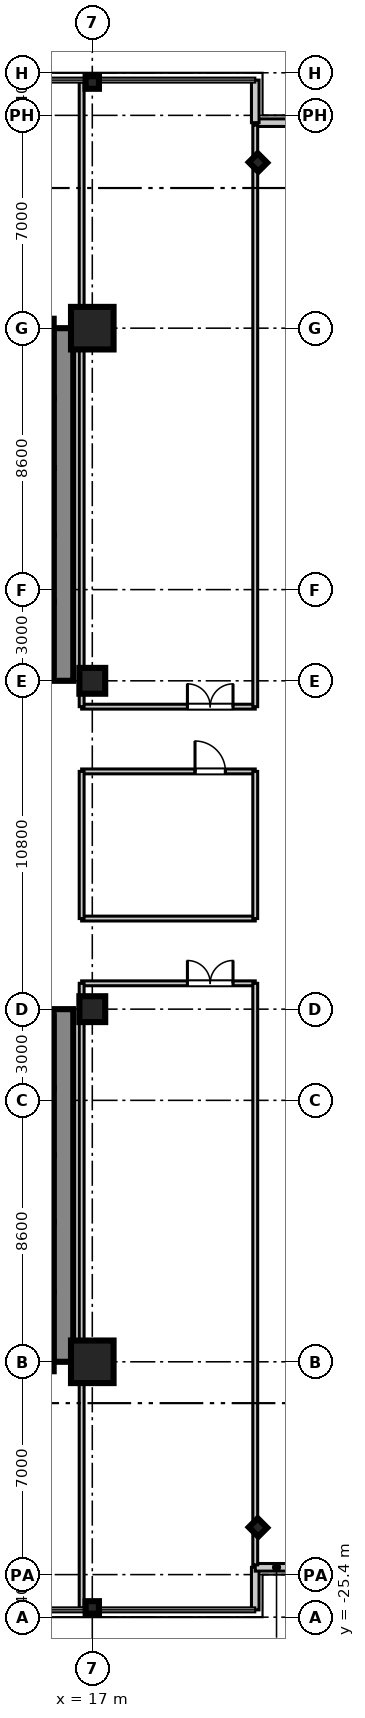
"""IFC4 building model, lengths in metres.
Left out: names, types, materials, properties, quantities, classifications, styles, units other than length and angle.
Written with IfcOpenShell. Run it as: python <this file> out.ifc"""

import sys

from ifc_helpers import new_model, si_unit, direction, frame, frame_2d, origin, origin_2d, place, context, subcontext, project, spatial, rectangle, i_section, extrude, source, transform, mapped, element, fill, save


model = new_model("IFC4")
c1 = context("Model", 3, precision=1e-05, world=origin(), true_north=direction((0.0, 1.0)))
c2 = subcontext(c1, "Body", "Model", "MODEL_VIEW")
j1 = project(units=[si_unit("LENGTHUNIT", "METRE"), si_unit("PLANEANGLEUNIT", "RADIAN")], contexts=[c1])
p1 = place(None, origin())
s1 = spatial("IfcSite", under=j1, at=p1, CompositionType="ELEMENT")
p2 = place(p1, origin())
s2 = spatial("IfcBuilding", under=s1, at=p2, CompositionType="ELEMENT")
p3 = place(p2, frame((0.0, 0.0, 39.7)))
s3 = spatial("IfcBuildingStorey", under=s2, at=p3, CompositionType="ELEMENT", Elevation=39.7)
m1 = source(origin(), c2, "Body", "SweptSolid", [
    extrude(rectangle(XDim=1.4, YDim=1.4, at=origin_2d()), origin(), (0.0, 0.0, 1.0), 3.605),
])
p4 = place(p3, frame((17.0, -17.0, 0.0), z_axis=(0.0, 0.0, 1.0), x_axis=(1.0, 0.0, 0.0)))
e1 = element("IfcColumn", 1, at=p4, inside=s3, PredefinedType="COLUMN", context=c2, shape_type="MappedRepresentation", body=[
    mapped(m1, transform((0.0, 0.0, 0.0), scale=1.0)),
])
m2 = source(origin(), c2, "Body", "SweptSolid", [
    extrude(rectangle(XDim=0.85, YDim=0.85, at=origin_2d()), origin(), (0.0, 0.0, 1.0), 3.605),
])
for number, where, z_axis, x_axis in (
    (2, (17.0, -5.4, 0.0), (0.0, 0.0, 1.0), (1.0, 0.0, 0.0)),
    (3, (17.0, 5.4, 0.0), (0.0, 0.0, 1.0), (1.0, 0.0, 0.0)),
):
    element("IfcColumn", number, at=place(p3, frame(where, z_axis=z_axis, x_axis=x_axis)), inside=s3, PredefinedType="PILASTER", context=c2, shape_type="MappedRepresentation", body=[
        mapped(m2, transform((0.0, 0.0, 0.0), scale=1.0)),
    ])
p5 = place(p3, frame((17.0, 17.0, 0.0), z_axis=(0.0, 0.0, 1.0), x_axis=(1.0, 0.0, 0.0)))
e4 = element("IfcColumn", 4, at=p5, inside=s3, PredefinedType="COLUMN", context=c2, shape_type="MappedRepresentation", body=[
    mapped(m1, transform((0.0, 0.0, 0.0), scale=1.0)),
])
m3 = source(origin(), c2, "Body", "SweptSolid", [
    extrude(i_section(OverallWidth=0.412, OverallDepth=0.438, WebThickness=0.023, FlangeThickness=0.036, at=origin_2d()), origin(), (0.0, 0.0, 1.0), 3.605),
])
for number, where, z_axis, x_axis in (
    (5, (17.0, -25.08, 0.0), (0.0, 0.0, 1.0), (0.0, 1.0, 0.0)),
    (6, (17.0, 25.08, 0.0), (0.0, 0.0, 1.0), (0.0, 1.0, 0.0)),
    (7, (22.45, -22.45, 0.0), (0.0, 0.0, 1.0), (0.707, 0.707, 0.0)),
    (8, (22.45, 22.45, 0.0), (0.0, 0.0, 1.0), (0.707, 0.707, 0.0)),
):
    element("IfcColumn", number, at=place(p3, frame(where, z_axis=z_axis, x_axis=x_axis)), inside=s3, PredefinedType="COLUMN", context=c2, shape_type="MappedRepresentation", body=[
        mapped(m3, transform((0.0, 0.0, 0.0), scale=1.0)),
    ])
m4 = source(origin(), c2, "Body", "SweptSolid", [
    extrude(rectangle(XDim=11.6, YDim=0.65, at=frame_2d((5.8, 0.0))), origin(), (0.0, 0.0, 1.0), 3.37),
])
for number, where, z_axis, x_axis in (
    (9, (16.05, 5.4, 0.0), (0.0, 0.0, 1.0), (0.0, 1.0, 0.0)),
    (10, (16.05, -17.0, 0.0), (0.0, 0.0, 1.0), (0.0, 1.0, 0.0)),
):
    element("IfcWall", number, at=place(p3, frame(where, z_axis=z_axis, x_axis=x_axis)), inside=s3, PredefinedType="SHEAR", context=c2, shape_type="MappedRepresentation", body=[
        mapped(m4, transform((0.0, 0.0, 0.0), scale=1.0)),
    ])
m5 = source(origin(), c2, "Body", "SweptSolid", [
    extrude(rectangle(XDim=2.36, YDim=0.22, at=frame_2d((1.18, 0.0))), origin(), (0.0, 0.0, 1.0), 3.37),
])
p6 = place(p3, frame((15.62, 5.64, 0.0), z_axis=(0.0, 0.0, 1.0), x_axis=(0.0, 1.0, 0.0)))
e11 = element("IfcWall", 11, at=p6, inside=s3, PredefinedType="SHEAR", context=c2, shape_type="MappedRepresentation", body=[
    mapped(m5, transform((0.0, 0.0, 0.0), scale=1.0)),
])
m6 = source(origin(), c2, "Body", "SweptSolid", [
    extrude(rectangle(XDim=2.2, YDim=0.22, at=frame_2d((1.1, 0.0))), origin(), (0.0, 0.0, 1.0), 3.37),
])
for number, where, z_axis, x_axis in (
    (12, (15.62, 8.0, 0.0), (0.0, 0.0, 1.0), (0.0, 1.0, 0.0)),
    (13, (15.62, 10.2, 0.0), (0.0, 0.0, 1.0), (0.0, 1.0, 0.0)),
):
    element("IfcWall", number, at=place(p3, frame(where, z_axis=z_axis, x_axis=x_axis)), inside=s3, PredefinedType="SHEAR", context=c2, shape_type="MappedRepresentation", body=[
        mapped(m6, transform((0.0, 0.0, 0.0), scale=1.0)),
    ])
m7 = source(origin(), c2, "Body", "SweptSolid", [
    extrude(rectangle(XDim=2.3, YDim=0.22, at=frame_2d((1.15, 0.0))), origin(), (0.0, 0.0, 1.0), 3.37),
])
p7 = place(p3, frame((15.62, 12.4, 0.0), z_axis=(0.0, 0.0, 1.0), x_axis=(0.0, 1.0, 0.0)))
e14 = element("IfcWall", 14, at=p7, inside=s3, PredefinedType="SHEAR", context=c2, shape_type="MappedRepresentation", body=[
    mapped(m7, transform((0.0, 0.0, 0.0), scale=1.0)),
])
p8 = place(p3, frame((15.62, -8.0, 0.0), z_axis=(0.0, 0.0, 1.0), x_axis=(0.0, 1.0, 0.0)))
e15 = element("IfcWall", 15, at=p8, inside=s3, PredefinedType="SHEAR", context=c2, shape_type="MappedRepresentation", body=[
    mapped(m5, transform((0.0, 0.0, 0.0), scale=1.0)),
])
for number, where, z_axis, x_axis in (
    (16, (15.62, -10.2, 0.0), (0.0, 0.0, 1.0), (0.0, 1.0, 0.0)),
    (17, (15.62, -12.4, 0.0), (0.0, 0.0, 1.0), (0.0, 1.0, 0.0)),
):
    element("IfcWall", number, at=place(p3, frame(where, z_axis=z_axis, x_axis=x_axis)), inside=s3, PredefinedType="SHEAR", context=c2, shape_type="MappedRepresentation", body=[
        mapped(m6, transform((0.0, 0.0, 0.0), scale=1.0)),
    ])
p9 = place(p3, frame((15.62, -14.7, 0.0), z_axis=(0.0, 0.0, 1.0), x_axis=(0.0, 1.0, 0.0)))
e18 = element("IfcWall", 18, at=p9, inside=s3, PredefinedType="SHEAR", context=c2, shape_type="MappedRepresentation", body=[
    mapped(m7, transform((0.0, 0.0, 0.0), scale=1.0)),
])
m8 = source(origin(), c2, "Body", "SweptSolid", [
    extrude(rectangle(XDim=2.61, YDim=0.22, at=frame_2d((1.305, 0.0))), origin(), (0.0, 0.0, 1.0), 3.37),
])
for number, where, z_axis, x_axis in (
    (19, (15.62, 14.7, 0.0), (0.0, 0.0, 1.0), (0.0, 1.0, 0.0)),
    (20, (15.62, -17.31, 0.0), (0.0, 0.0, 1.0), (0.0, 1.0, 0.0)),
):
    element("IfcWall", number, at=place(p3, frame(where, z_axis=z_axis, x_axis=x_axis)), inside=s3, PredefinedType="SHEAR", context=c2, shape_type="MappedRepresentation", body=[
        mapped(m8, transform((0.0, 0.0, 0.0), scale=1.0)),
    ])
m9 = source(origin(), c2, "Body", "SweptSolid", [
    extrude(rectangle(XDim=1.4, YDim=0.25, at=frame_2d((0.7, 0.0))), origin(), (0.0, 0.0, 1.0), 3.37),
])
for number, where, z_axis, x_axis in (
    (21, (22.36, -25.16, 0.0), (0.0, 0.0, 1.0), (0.0, 1.0, 0.0)),
    (22, (22.36, -23.76, 0.0), (0.0, 0.0, 1.0), (1.0, 0.0, 0.0)),
    (23, (22.36, 23.76, 0.0), (0.0, 0.0, 1.0), (1.0, 0.0, 0.0)),
    (24, (22.36, 23.76, 0.0), (0.0, 0.0, 1.0), (0.0, 1.0, 0.0)),
):
    element("IfcWall", number, at=place(p3, frame(where, z_axis=z_axis, x_axis=x_axis)), inside=s3, PredefinedType="STANDARD", context=c2, shape_type="MappedRepresentation", body=[
        mapped(m9, transform((0.0, 0.0, 0.0), scale=1.0)),
    ])
m10 = source(origin(), c2, "Body", "SweptSolid", [
    extrude(rectangle(XDim=5.71, YDim=0.16, at=frame_2d((2.855, 0.0))), origin(), (0.0, 0.0, 1.0), 2.71),
])
p10 = place(p3, frame((16.65, 4.55, 0.0), z_axis=(0.0, 0.0, 1.0), x_axis=(1.0, 0.0, 0.0)))
e25 = element("IfcWall", 25, at=p10, inside=s3, PredefinedType="PARTITIONING", context=c2, shape_type="MappedRepresentation", body=[
    mapped(m10, transform((0.0, 0.0, 0.0), scale=1.0)),
])
p11 = place(p10, frame((3.479, 0.0, 0.0)))
e26 = element("IfcOpeningElement", 26, at=p11, cuts=e25, PredefinedType="OPENING", context=c2, shape_type="SweptSolid", body=[
    extrude(rectangle(XDim=1.5, YDim=2.15, at=frame_2d((0.75, 1.075))), frame((0.0, 0.09, 0.0), z_axis=(0.0, -1.0, 0.0), x_axis=(1.0, 0.0, 0.0)), (0.0, 0.0, 1.0), 0.18),
])
m11 = source(origin(), c2, "Body", "SweptSolid", [
    extrude(rectangle(XDim=20.55, YDim=0.16, at=frame_2d((10.275, 0.0))), origin(), (0.0, 0.0, 1.0), 2.71),
])
p12 = place(p3, frame((16.65, 4.55, 0.0), z_axis=(0.0, 0.0, 1.0), x_axis=(0.0, 1.0, 0.0)))
e27 = element("IfcWall", 27, at=p12, inside=s3, PredefinedType="PARTITIONING", context=c2, shape_type="MappedRepresentation", body=[
    mapped(m11, transform((0.0, 0.0, 0.0), scale=1.0)),
])
m12 = source(origin(), c2, "Body", "SweptSolid", [
    extrude(rectangle(XDim=19.13, YDim=0.16, at=frame_2d((9.565, 0.0))), origin(), (0.0, 0.0, 1.0), 2.71),
])
p13 = place(p3, frame((22.36, 4.55, 0.0), z_axis=(0.0, 0.0, 1.0), x_axis=(0.0, 1.0, 0.0)))
e28 = element("IfcWall", 28, at=p13, inside=s3, PredefinedType="PARTITIONING", context=c2, shape_type="MappedRepresentation", body=[
    mapped(m12, transform((0.0, 0.0, 0.0), scale=1.0)),
])
p14 = place(p3, frame((16.65, -4.55, 0.0), z_axis=(0.0, 0.0, 1.0), x_axis=(1.0, 0.0, 0.0)))
e29 = element("IfcWall", 29, at=p14, inside=s3, PredefinedType="PARTITIONING", context=c2, shape_type="MappedRepresentation", body=[
    mapped(m10, transform((0.0, 0.0, 0.0), scale=1.0)),
])
p15 = place(p14, frame((3.479, 0.0, 0.0)))
e30 = element("IfcOpeningElement", 30, at=p15, cuts=e29, PredefinedType="OPENING", context=c2, shape_type="SweptSolid", body=[
    extrude(rectangle(XDim=1.5, YDim=2.15, at=frame_2d((0.75, 1.075))), frame((0.0, 0.09, 0.0), z_axis=(0.0, -1.0, 0.0), x_axis=(1.0, 0.0, 0.0)), (0.0, 0.0, 1.0), 0.18),
])
p16 = place(p3, frame((16.65, -25.1, 0.0), z_axis=(0.0, 0.0, 1.0), x_axis=(0.0, 1.0, 0.0)))
e31 = element("IfcWall", 31, at=p16, inside=s3, PredefinedType="PARTITIONING", context=c2, shape_type="MappedRepresentation", body=[
    mapped(m11, transform((0.0, 0.0, 0.0), scale=1.0)),
])
p17 = place(p3, frame((22.36, -23.68, 0.0), z_axis=(0.0, 0.0, 1.0), x_axis=(0.0, 1.0, 0.0)))
e32 = element("IfcWall", 32, at=p17, inside=s3, PredefinedType="PARTITIONING", context=c2, shape_type="MappedRepresentation", body=[
    mapped(m12, transform((0.0, 0.0, 0.0), scale=1.0)),
])
p18 = place(p3, frame((16.65, -2.42, 0.0), z_axis=(0.0, 0.0, 1.0), x_axis=(1.0, 0.0, 0.0)))
e33 = element("IfcWall", 33, at=p18, inside=s3, PredefinedType="PARTITIONING", context=c2, shape_type="MappedRepresentation", body=[
    mapped(m10, transform((0.0, 0.0, 0.0), scale=1.0)),
])
p19 = place(p3, frame((16.65, 2.42, 0.0), z_axis=(0.0, 0.0, 1.0), x_axis=(1.0, 0.0, 0.0)))
e34 = element("IfcWall", 34, at=p19, inside=s3, PredefinedType="PARTITIONING", context=c2, shape_type="MappedRepresentation", body=[
    mapped(m10, transform((0.0, 0.0, 0.0), scale=1.0)),
])
p20 = place(p19, frame((3.729, 0.0, 0.0)))
e35 = element("IfcOpeningElement", 35, at=p20, cuts=e34, PredefinedType="OPENING", context=c2, shape_type="SweptSolid", body=[
    extrude(rectangle(XDim=1.0, YDim=2.1, at=frame_2d((0.5, 1.05))), frame((0.0, 0.09, 0.0), z_axis=(0.0, -1.0, 0.0), x_axis=(1.0, 0.0, 0.0)), (0.0, 0.0, 1.0), 0.18),
])
m13 = source(origin(), c2, "Body", "SweptSolid", [
    extrude(rectangle(XDim=4.84, YDim=0.16, at=frame_2d((2.42, 0.0))), origin(), (0.0, 0.0, 1.0), 2.71),
])
for number, where, z_axis, x_axis in (
    (36, (16.65, -2.42, 0.0), (0.0, 0.0, 1.0), (0.0, 1.0, 0.0)),
    (37, (22.36, -2.42, 0.0), (0.0, 0.0, 1.0), (0.0, 1.0, 0.0)),
):
    element("IfcWall", number, at=place(p3, frame(where, z_axis=z_axis, x_axis=x_axis)), inside=s3, PredefinedType="PARTITIONING", context=c2, shape_type="MappedRepresentation", body=[
        mapped(m13, transform((0.0, 0.0, 0.0), scale=1.0)),
    ])
m14 = source(origin(), c2, "Body", "SweptSolid", [
    extrude(rectangle(XDim=1.5, YDim=2.15, at=frame_2d((0.75, 1.075))), frame((0.0, 0.025, 0.0), z_axis=(0.0, -1.0, 0.0), x_axis=(1.0, 0.0, 0.0)), (0.0, 0.0, 1.0), 0.05),
])
p21 = place(p11, origin())
e38 = element("IfcDoor", 38, at=p21, inside=s3, OperationType="DOUBLE_DOOR_SINGLE_SWING", PredefinedType="DOOR", context=c2, shape_type="MappedRepresentation", body=[
    mapped(m14, transform((0.0, 0.0, 0.0), scale=1.0)),
])
fill(e26, e38)
p22 = place(p15, frame((1.5, 0.0, 0.0), z_axis=(0.0, 0.0, 1.0), x_axis=(-1.0, 0.0, 0.0)))
e39 = element("IfcDoor", 39, at=p22, inside=s3, OperationType="DOUBLE_DOOR_SINGLE_SWING", PredefinedType="DOOR", context=c2, shape_type="MappedRepresentation", body=[
    mapped(m14, transform((0.0, 0.0, 0.0), scale=1.0)),
])
fill(e30, e39)
m15 = source(origin(), c2, "Body", "SweptSolid", [
    extrude(rectangle(XDim=1.0, YDim=2.1, at=frame_2d((0.5, 1.05))), frame((0.0, 0.025, 0.0), z_axis=(0.0, -1.0, 0.0), x_axis=(1.0, 0.0, 0.0)), (0.0, 0.0, 1.0), 0.05),
])
p23 = place(p20, frame((1.0, 0.0, 0.0), z_axis=(0.0, 0.0, 1.0), x_axis=(-1.0, 0.0, 0.0)))
e40 = element("IfcDoor", 40, at=p23, inside=s3, OperationType="SINGLE_SWING_LEFT", PredefinedType="DOOR", context=c2, shape_type="MappedRepresentation", body=[
    mapped(m15, transform((0.0, 0.0, 0.0), scale=1.0)),
])
fill(e35, e40)
save(model, sys.argv[1])
